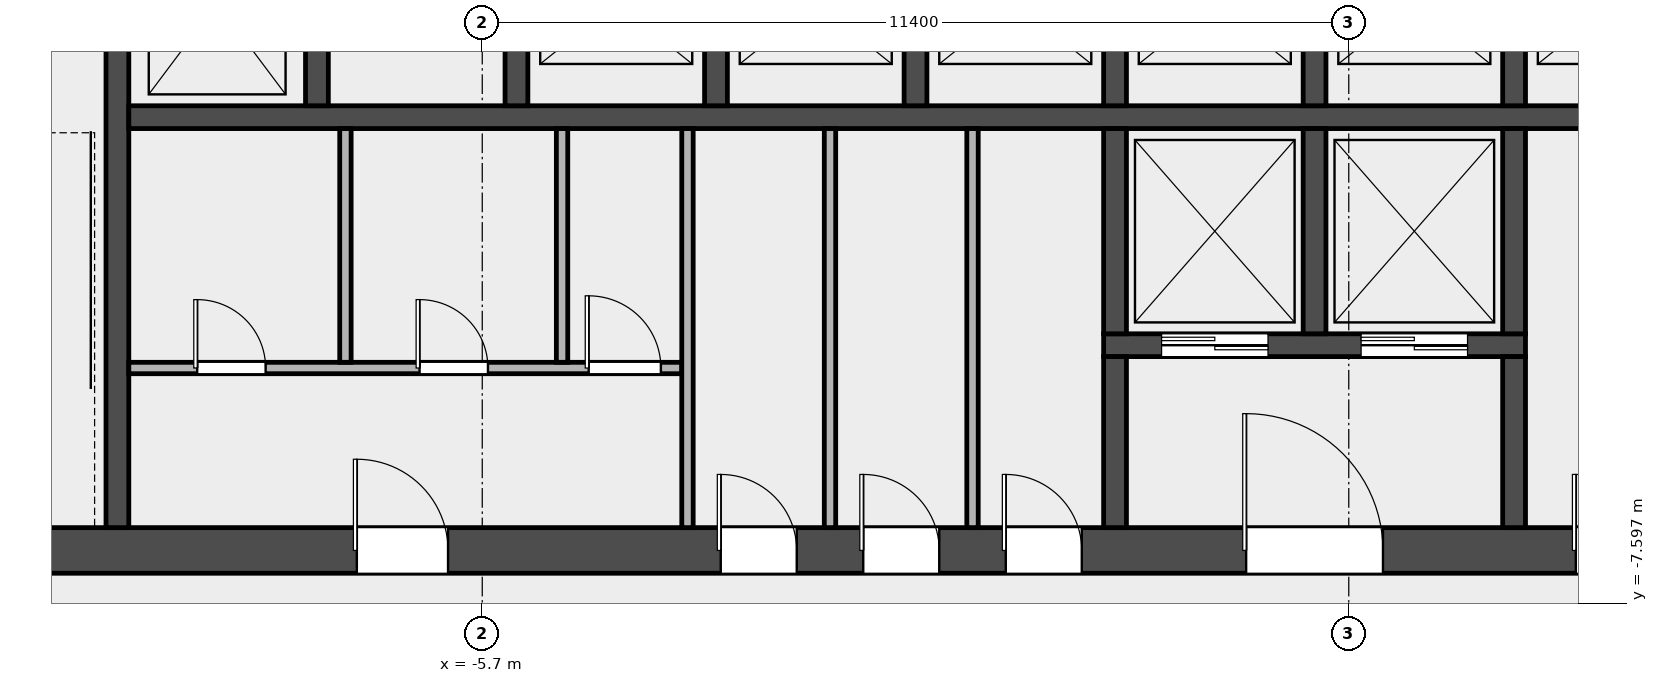
"""IFC4 building model, lengths in metres.
Left out: names, types, materials, properties, quantities, classifications, styles, units other than length and angle.
Written with IfcOpenShell. Run it as: python <this file> out.ifc"""

import sys

from ifc_helpers import new_model, si_unit, direction, frame, frame_2d, origin, place, context, subcontext, project, spatial, rectangle, extrude, element, fill, save


model = new_model("IFC4")
c1 = context("Model", 3, precision=1e-05, world=origin(), true_north=direction((0.0, 1.0)))
c2 = subcontext(c1, "Body", "Model", "MODEL_VIEW")
j1 = project(units=[si_unit("LENGTHUNIT", "METRE"), si_unit("PLANEANGLEUNIT", "RADIAN")], contexts=[c1])
p1 = place(None, origin())
s1 = spatial("IfcSite", under=j1, at=p1, CompositionType="ELEMENT")
p2 = place(p1, origin())
s2 = spatial("IfcBuilding", under=s1, at=p2, CompositionType="ELEMENT")
p3 = place(p2, frame((0.0, 0.0, 117.1)))
s3 = spatial("IfcBuildingStorey", under=s2, at=p3, CompositionType="ELEMENT", Elevation=117.1)
p4 = place(p3, frame((-14.4, -6.9, 0.0), z_axis=(0.0, 0.0, 1.0), x_axis=(1.0, 0.0, 0.0)))
e1 = element("IfcWall", 1, at=p4, inside=s3, PredefinedType="SHEAR", context=c2, shape_type="SweptSolid", body=[
    extrude(rectangle(XDim=28.8, YDim=0.6, at=frame_2d((14.4, 0.0))), origin(), (0.0, 0.0, 1.0), 4.2),
])
p5 = place(p4, frame((7.05, 0.0, 0.0)))
e2 = element("IfcOpeningElement", 2, at=p5, cuts=e1, PredefinedType="OPENING", context=c2, shape_type="SweptSolid", body=[
    extrude(rectangle(XDim=1.2, YDim=2.1, at=frame_2d((0.6, 1.05))), frame((0.0, 0.312, 0.0), z_axis=(0.0, -1.0, 0.0), x_axis=(1.0, 0.0, 0.0)), (0.0, 0.0, 1.0), 0.624),
])
p6 = place(p4, frame((11.837, 0.0, 0.0)))
e3 = element("IfcOpeningElement", 3, at=p6, cuts=e1, PredefinedType="OPENING", context=c2, shape_type="SweptSolid", body=[
    extrude(rectangle(XDim=1.0, YDim=2.1, at=frame_2d((0.5, 1.05))), frame((0.0, 0.312, 0.0), z_axis=(0.0, -1.0, 0.0), x_axis=(1.0, 0.0, 0.0)), (0.0, 0.0, 1.0), 0.624),
])
p7 = place(p4, frame((13.712, 0.0, 0.0)))
e4 = element("IfcOpeningElement", 4, at=p7, cuts=e1, PredefinedType="OPENING", context=c2, shape_type="SweptSolid", body=[
    extrude(rectangle(XDim=1.0, YDim=2.1, at=frame_2d((0.5, 1.05))), frame((0.0, 0.312, 0.0), z_axis=(0.0, -1.0, 0.0), x_axis=(1.0, 0.0, 0.0)), (0.0, 0.0, 1.0), 0.624),
])
p8 = place(p4, frame((15.587, 0.0, 0.0)))
e5 = element("IfcOpeningElement", 5, at=p8, cuts=e1, PredefinedType="OPENING", context=c2, shape_type="SweptSolid", body=[
    extrude(rectangle(XDim=1.0, YDim=2.1, at=frame_2d((0.5, 1.05))), frame((0.0, 0.312, 0.0), z_axis=(0.0, -1.0, 0.0), x_axis=(1.0, 0.0, 0.0)), (0.0, 0.0, 1.0), 0.624),
])
p9 = place(p4, frame((18.75, 0.0, 0.0)))
e6 = element("IfcOpeningElement", 6, at=p9, cuts=e1, PredefinedType="OPENING", context=c2, shape_type="SweptSolid", body=[
    extrude(rectangle(XDim=1.8, YDim=2.1, at=frame_2d((0.9, 1.05))), frame((0.0, 0.312, 0.0), z_axis=(0.0, -1.0, 0.0), x_axis=(1.0, 0.0, 0.0)), (0.0, 0.0, 1.0), 0.624),
])
p10 = place(p4, frame((23.087, 0.0, 0.0)))
e7 = element("IfcOpeningElement", 7, at=p10, cuts=e1, PredefinedType="OPENING", context=c2, shape_type="SweptSolid", body=[
    extrude(rectangle(XDim=1.0, YDim=2.1, at=frame_2d((0.5, 1.05))), frame((0.0, 0.312, 0.0), z_axis=(0.0, -1.0, 0.0), x_axis=(1.0, 0.0, 0.0)), (0.0, 0.0, 1.0), 0.624),
])
p11 = place(p3, frame((-10.5, -6.6, 0.0), z_axis=(0.0, 0.0, 1.0), x_axis=(0.0, 1.0, 0.0)))
e8 = element("IfcWall", 8, at=p11, inside=s3, PredefinedType="SHEAR", context=c2, shape_type="SweptSolid", body=[
    extrude(rectangle(XDim=8.55, YDim=0.3, at=frame_2d((4.275, 0.0))), origin(), (0.0, 0.0, 1.0), 4.2),
])
p12 = place(p3, frame((-10.35, -1.2, 0.0), z_axis=(0.0, 0.0, 1.0), x_axis=(1.0, 0.0, 0.0)))
e9 = element("IfcWall", 9, at=p12, inside=s3, PredefinedType="SOLIDWALL", context=c2, shape_type="SweptSolid", body=[
    extrude(rectangle(XDim=20.7, YDim=0.3, at=frame_2d((10.35, 0.0))), origin(), (0.0, 0.0, 1.0), 4.2),
])
for number, where, z_axis, x_axis in (
    (10, (-7.875, -1.05, 0.0), (0.0, 0.0, 1.0), (0.0, 1.0, 0.0)),
    (11, (-5.25, -1.05, 0.0), (0.0, 0.0, 1.0), (0.0, 1.0, 0.0)),
    (12, (-2.625, -1.05, 0.0), (0.0, 0.0, 1.0), (0.0, 1.0, 0.0)),
    (13, (0.0, -1.05, 0.0), (0.0, 0.0, 1.0), (0.0, 1.0, 0.0)),
    (14, (2.625, -1.05, 0.0), (0.0, 0.0, 1.0), (0.0, 1.0, 0.0)),
    (15, (5.25, -1.05, 0.0), (0.0, 0.0, 1.0), (0.0, 1.0, 0.0)),
    (16, (7.875, -1.05, 0.0), (0.0, 0.0, 1.0), (0.0, 1.0, 0.0)),
):
    element("IfcWall", number, at=place(p3, frame(where, z_axis=z_axis, x_axis=x_axis)), inside=s3, PredefinedType="SOLIDWALL", context=c2, shape_type="SweptSolid", body=[
        extrude(rectangle(XDim=2.7, YDim=0.3, at=frame_2d((1.35, 0.0))), origin(), (0.0, 0.0, 1.0), 4.2),
    ])
p13 = place(p3, frame((2.475, -4.2, 0.0), z_axis=(0.0, 0.0, 1.0), x_axis=(1.0, 0.0, 0.0)))
e17 = element("IfcWall", 17, at=p13, inside=s3, PredefinedType="SOLIDWALL", context=c2, shape_type="SweptSolid", body=[
    extrude(rectangle(XDim=5.55, YDim=0.3, at=frame_2d((2.775, 0.0))), origin(), (0.0, 0.0, 1.0), 4.2),
])
p14 = place(p13, frame((0.762, 0.0, 0.0)))
e18 = element("IfcOpeningElement", 18, at=p14, cuts=e17, PredefinedType="OPENING", context=c2, shape_type="SweptSolid", body=[
    extrude(rectangle(XDim=1.4, YDim=2.1, at=frame_2d((0.7, 1.05))), frame((0.0, 0.162, 0.0), z_axis=(0.0, -1.0, 0.0), x_axis=(1.0, 0.0, 0.0)), (0.0, 0.0, 1.0), 0.324),
])
p15 = place(p13, frame((3.387, 0.0, 0.0)))
e19 = element("IfcOpeningElement", 19, at=p15, cuts=e17, PredefinedType="OPENING", context=c2, shape_type="SweptSolid", body=[
    extrude(rectangle(XDim=1.4, YDim=2.1, at=frame_2d((0.7, 1.05))), frame((0.0, 0.162, 0.0), z_axis=(0.0, -1.0, 0.0), x_axis=(1.0, 0.0, 0.0)), (0.0, 0.0, 1.0), 0.324),
])
p16 = place(p3, frame((2.625, -4.05, 0.0), z_axis=(0.0, 0.0, 1.0), x_axis=(0.0, 1.0, 0.0)))
e20 = element("IfcWall", 20, at=p16, inside=s3, PredefinedType="SOLIDWALL", context=c2, shape_type="SweptSolid", body=[
    extrude(rectangle(XDim=2.7, YDim=0.3, at=frame_2d((1.35, 0.0))), origin(), (0.0, 0.0, 1.0), 4.2),
])
p17 = place(p3, frame((2.625, -6.6, 0.0), z_axis=(0.0, 0.0, 1.0), x_axis=(0.0, 1.0, 0.0)))
e21 = element("IfcWall", 21, at=p17, inside=s3, PredefinedType="SOLIDWALL", context=c2, shape_type="SweptSolid", body=[
    extrude(rectangle(XDim=2.25, YDim=0.3, at=frame_2d((1.125, 0.0))), origin(), (0.0, 0.0, 1.0), 4.2),
])
for number, where, z_axis, x_axis in (
    (22, (5.25, -4.05, 0.0), (0.0, 0.0, 1.0), (0.0, 1.0, 0.0)),
    (23, (7.875, -4.05, 0.0), (0.0, 0.0, 1.0), (0.0, 1.0, 0.0)),
):
    element("IfcWall", number, at=place(p3, frame(where, z_axis=z_axis, x_axis=x_axis)), inside=s3, PredefinedType="SOLIDWALL", context=c2, shape_type="SweptSolid", body=[
        extrude(rectangle(XDim=2.7, YDim=0.3, at=frame_2d((1.35, 0.0))), origin(), (0.0, 0.0, 1.0), 4.2),
    ])
p18 = place(p3, frame((7.875, -6.6, 0.0), z_axis=(0.0, 0.0, 1.0), x_axis=(0.0, 1.0, 0.0)))
e24 = element("IfcWall", 24, at=p18, inside=s3, PredefinedType="SOLIDWALL", context=c2, shape_type="SweptSolid", body=[
    extrude(rectangle(XDim=2.25, YDim=0.3, at=frame_2d((1.125, 0.0))), origin(), (0.0, 0.0, 1.0), 4.2),
])
p19 = place(p3, frame((-10.35, -4.5, 0.0), z_axis=(0.0, 0.0, 1.0), x_axis=(1.0, 0.0, 0.0)))
e25 = element("IfcWall", 25, at=p19, inside=s3, PredefinedType="PARTITIONING", context=c2, shape_type="SweptSolid", body=[
    extrude(rectangle(XDim=7.275, YDim=0.15, at=frame_2d((3.638, 0.0))), origin(), (0.0, 0.0, 1.0), 4.2),
])
p20 = place(p19, frame((0.9, 0.0, 0.0)))
e26 = element("IfcOpeningElement", 26, at=p20, cuts=e25, PredefinedType="OPENING", context=c2, shape_type="SweptSolid", body=[
    extrude(rectangle(XDim=0.9, YDim=2.1, at=frame_2d((0.45, 1.05))), frame((0.0, 0.087, 0.0), z_axis=(0.0, -1.0, 0.0), x_axis=(1.0, 0.0, 0.0)), (0.0, 0.0, 1.0), 0.174),
])
p21 = place(p19, frame((3.825, 0.0, 0.0)))
e27 = element("IfcOpeningElement", 27, at=p21, cuts=e25, PredefinedType="OPENING", context=c2, shape_type="SweptSolid", body=[
    extrude(rectangle(XDim=0.9, YDim=2.1, at=frame_2d((0.45, 1.05))), frame((0.0, 0.087, 0.0), z_axis=(0.0, -1.0, 0.0), x_axis=(1.0, 0.0, 0.0)), (0.0, 0.0, 1.0), 0.174),
])
p22 = place(p19, frame((6.05, 0.0, 0.0)))
e28 = element("IfcOpeningElement", 28, at=p22, cuts=e25, PredefinedType="OPENING", context=c2, shape_type="SweptSolid", body=[
    extrude(rectangle(XDim=0.95, YDim=2.1, at=frame_2d((0.475, 1.05))), frame((0.0, 0.087, 0.0), z_axis=(0.0, -1.0, 0.0), x_axis=(1.0, 0.0, 0.0)), (0.0, 0.0, 1.0), 0.174),
])
for number, where, z_axis, x_axis in (
    (29, (-7.5, -4.425, 0.0), (0.0, 0.0, 1.0), (0.0, 1.0, 0.0)),
    (30, (-4.65, -4.425, 0.0), (0.0, 0.0, 1.0), (0.0, 1.0, 0.0)),
):
    element("IfcWall", number, at=place(p3, frame(where, z_axis=z_axis, x_axis=x_axis)), inside=s3, PredefinedType="PARTITIONING", context=c2, shape_type="SweptSolid", body=[
        extrude(rectangle(XDim=3.075, YDim=0.15, at=frame_2d((1.538, 0.0))), origin(), (0.0, 0.0, 1.0), 4.2),
    ])
for number, where, z_axis, x_axis in (
    (31, (-3.0, -6.6, 0.0), (0.0, 0.0, 1.0), (0.0, 1.0, 0.0)),
    (32, (-1.125, -6.6, 0.0), (0.0, 0.0, 1.0), (0.0, 1.0, 0.0)),
    (33, (0.75, -6.6, 0.0), (0.0, 0.0, 1.0), (0.0, 1.0, 0.0)),
):
    element("IfcWall", number, at=place(p3, frame(where, z_axis=z_axis, x_axis=x_axis)), inside=s3, PredefinedType="PARTITIONING", context=c2, shape_type="SweptSolid", body=[
        extrude(rectangle(XDim=5.25, YDim=0.15, at=frame_2d((2.625, 0.0))), origin(), (0.0, 0.0, 1.0), 4.2),
    ])
p23 = place(p14, origin())
e34 = element("IfcDoor", 34, at=p23, inside=s3, OperationType="DOUBLE_DOOR_SLIDING", PredefinedType="DOOR", context=c2, shape_type="SweptSolid", body=[
    extrude(rectangle(XDim=1.4, YDim=2.1, at=frame_2d((0.7, 1.05))), frame((0.0, 0.025, 0.0), z_axis=(0.0, -1.0, 0.0), x_axis=(1.0, 0.0, 0.0)), (0.0, 0.0, 1.0), 0.05),
])
fill(e18, e34)
p24 = place(p15, origin())
e35 = element("IfcDoor", 35, at=p24, inside=s3, OperationType="DOUBLE_DOOR_SLIDING", PredefinedType="DOOR", context=c2, shape_type="SweptSolid", body=[
    extrude(rectangle(XDim=1.4, YDim=2.1, at=frame_2d((0.7, 1.05))), frame((0.0, 0.025, 0.0), z_axis=(0.0, -1.0, 0.0), x_axis=(1.0, 0.0, 0.0)), (0.0, 0.0, 1.0), 0.05),
])
fill(e19, e35)
p25 = place(p5, origin())
e36 = element("IfcDoor", 36, at=p25, inside=s3, OperationType="SINGLE_SWING_LEFT", PredefinedType="DOOR", context=c2, shape_type="SweptSolid", body=[
    extrude(rectangle(XDim=1.2, YDim=2.1, at=frame_2d((0.6, 1.05))), frame((0.0, 0.025, 0.0), z_axis=(0.0, -1.0, 0.0), x_axis=(1.0, 0.0, 0.0)), (0.0, 0.0, 1.0), 0.05),
])
fill(e2, e36)
p26 = place(p20, origin())
e37 = element("IfcDoor", 37, at=p26, inside=s3, OperationType="SINGLE_SWING_LEFT", PredefinedType="DOOR", context=c2, shape_type="SweptSolid", body=[
    extrude(rectangle(XDim=0.9, YDim=2.1, at=frame_2d((0.45, 1.05))), frame((0.0, 0.025, 0.0), z_axis=(0.0, -1.0, 0.0), x_axis=(1.0, 0.0, 0.0)), (0.0, 0.0, 1.0), 0.05),
])
fill(e26, e37)
p27 = place(p21, origin())
e38 = element("IfcDoor", 38, at=p27, inside=s3, OperationType="SINGLE_SWING_LEFT", PredefinedType="DOOR", context=c2, shape_type="SweptSolid", body=[
    extrude(rectangle(XDim=0.9, YDim=2.1, at=frame_2d((0.45, 1.05))), frame((0.0, 0.025, 0.0), z_axis=(0.0, -1.0, 0.0), x_axis=(1.0, 0.0, 0.0)), (0.0, 0.0, 1.0), 0.05),
])
fill(e27, e38)
p28 = place(p22, origin())
e39 = element("IfcDoor", 39, at=p28, inside=s3, OperationType="SINGLE_SWING_LEFT", PredefinedType="DOOR", context=c2, shape_type="SweptSolid", body=[
    extrude(rectangle(XDim=0.95, YDim=2.1, at=frame_2d((0.475, 1.05))), frame((0.0, 0.025, 0.0), z_axis=(0.0, -1.0, 0.0), x_axis=(1.0, 0.0, 0.0)), (0.0, 0.0, 1.0), 0.05),
])
fill(e28, e39)
p29 = place(p6, origin())
e40 = element("IfcDoor", 40, at=p29, inside=s3, OperationType="SINGLE_SWING_LEFT", PredefinedType="DOOR", context=c2, shape_type="SweptSolid", body=[
    extrude(rectangle(XDim=1.0, YDim=2.1, at=frame_2d((0.5, 1.05))), frame((0.0, 0.025, 0.0), z_axis=(0.0, -1.0, 0.0), x_axis=(1.0, 0.0, 0.0)), (0.0, 0.0, 1.0), 0.05),
])
fill(e3, e40)
p30 = place(p7, origin())
e41 = element("IfcDoor", 41, at=p30, inside=s3, OperationType="SINGLE_SWING_LEFT", PredefinedType="DOOR", context=c2, shape_type="SweptSolid", body=[
    extrude(rectangle(XDim=1.0, YDim=2.1, at=frame_2d((0.5, 1.05))), frame((0.0, 0.025, 0.0), z_axis=(0.0, -1.0, 0.0), x_axis=(1.0, 0.0, 0.0)), (0.0, 0.0, 1.0), 0.05),
])
fill(e4, e41)
p31 = place(p8, origin())
e42 = element("IfcDoor", 42, at=p31, inside=s3, OperationType="SINGLE_SWING_LEFT", PredefinedType="DOOR", context=c2, shape_type="SweptSolid", body=[
    extrude(rectangle(XDim=1.0, YDim=2.1, at=frame_2d((0.5, 1.05))), frame((0.0, 0.025, 0.0), z_axis=(0.0, -1.0, 0.0), x_axis=(1.0, 0.0, 0.0)), (0.0, 0.0, 1.0), 0.05),
])
fill(e5, e42)
p32 = place(p9, origin())
e43 = element("IfcDoor", 43, at=p32, inside=s3, OperationType="DOUBLE_DOOR_SINGLE_SWING", PredefinedType="DOOR", context=c2, shape_type="SweptSolid", body=[
    extrude(rectangle(XDim=1.8, YDim=2.1, at=frame_2d((0.9, 1.05))), frame((0.0, 0.025, 0.0), z_axis=(0.0, -1.0, 0.0), x_axis=(1.0, 0.0, 0.0)), (0.0, 0.0, 1.0), 0.05),
])
fill(e6, e43)
p33 = place(p10, origin())
e44 = element("IfcDoor", 44, at=p33, inside=s3, OperationType="SINGLE_SWING_LEFT", PredefinedType="DOOR", context=c2, shape_type="SweptSolid", body=[
    extrude(rectangle(XDim=1.0, YDim=2.1, at=frame_2d((0.5, 1.05))), frame((0.0, 0.025, 0.0), z_axis=(0.0, -1.0, 0.0), x_axis=(1.0, 0.0, 0.0)), (0.0, 0.0, 1.0), 0.05),
])
fill(e7, e44)
save(model, sys.argv[1])
